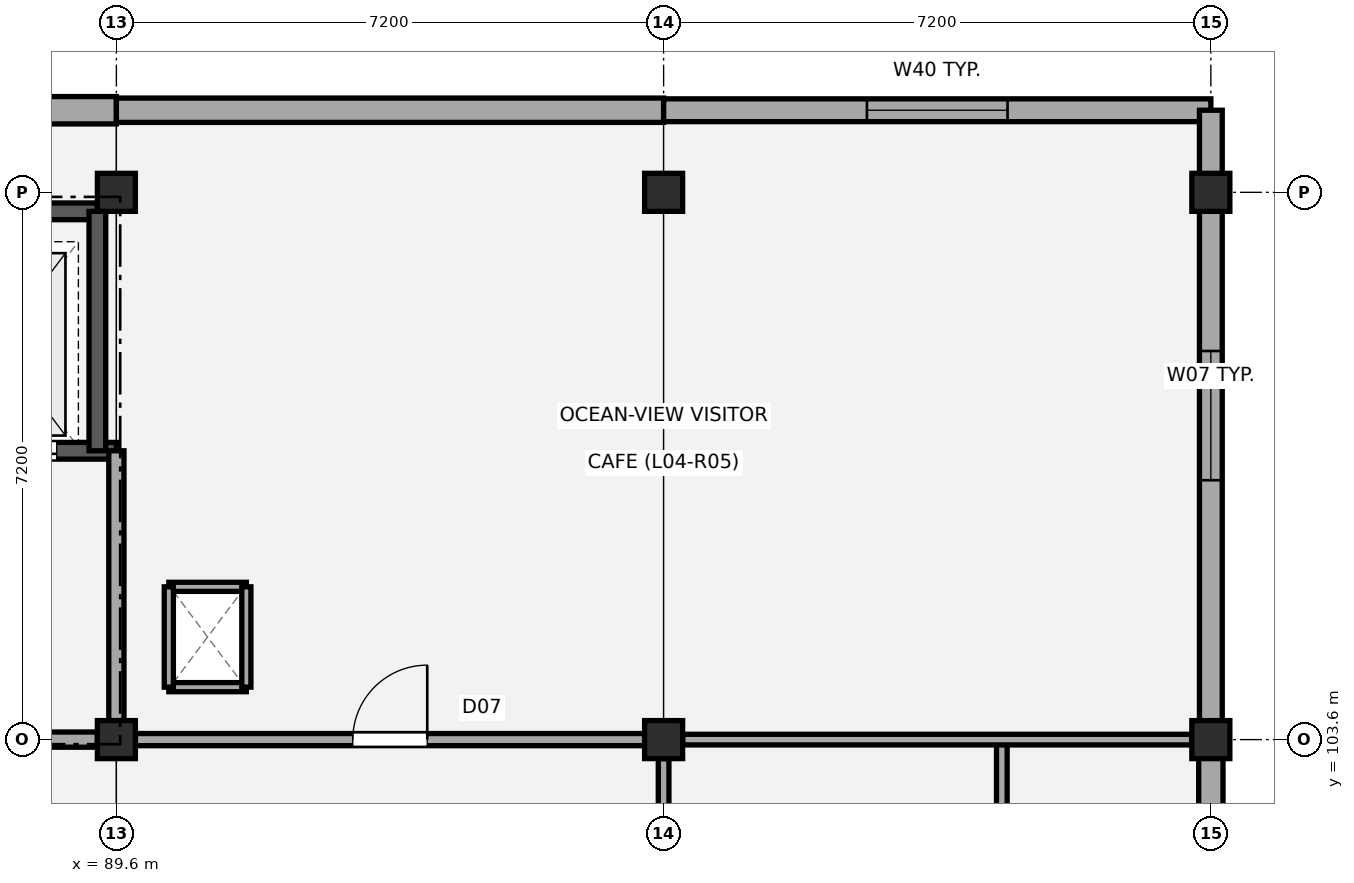
"""IFC4 building model, lengths in metres.
Left out: names, types, materials, properties, quantities, classifications, styles, units other than length and angle.
Written with IfcOpenShell. Run it as: python <this file> out.ifc"""

import sys

from ifc_helpers import new_model, si_unit, direction, frame, frame_2d, origin, origin_2d, place, context, subcontext, project, spatial, rectangle, extrude, element, fill, save


model = new_model("IFC4")
c1 = context("Model", 3, precision=1e-05, world=origin(), true_north=direction((0.0, 1.0)))
c2 = subcontext(c1, "Body", "Model", "MODEL_VIEW")
j1 = project(units=[si_unit("LENGTHUNIT", "METRE"), si_unit("PLANEANGLEUNIT", "RADIAN")], contexts=[c1])
p1 = place(None, origin())
s1 = spatial("IfcSite", under=j1, at=p1, CompositionType="ELEMENT")
p2 = place(p1, origin())
s2 = spatial("IfcBuilding", under=s1, at=p2, CompositionType="ELEMENT")
p3 = place(p2, frame((0.0, 0.0, 17.64)))
s3 = spatial("IfcBuildingStorey", under=s2, at=p3, CompositionType="ELEMENT", Elevation=17.64)
for number, where, z_axis, x_axis in (
    (1, (89.6, 103.6, 0.0), (0.0, 0.0, 1.0), (1.0, 0.0, 0.0)),
    (2, (89.6, 110.8, 0.0), (0.0, 0.0, 1.0), (1.0, 0.0, 0.0)),
    (3, (96.8, 103.6, 0.0), (0.0, 0.0, 1.0), (1.0, 0.0, 0.0)),
    (4, (96.8, 110.8, 0.0), (0.0, 0.0, 1.0), (1.0, 0.0, 0.0)),
    (5, (104.0, 103.6, 0.0), (0.0, 0.0, 1.0), (1.0, 0.0, 0.0)),
    (6, (104.0, 110.8, 0.0), (0.0, 0.0, 1.0), (1.0, 0.0, 0.0)),
):
    element("IfcColumn", number, at=place(p3, frame(where, z_axis=z_axis, x_axis=x_axis)), inside=s3, PredefinedType="COLUMN", context=c2, shape_type="SweptSolid", body=[
        extrude(rectangle(XDim=0.5, YDim=0.5, at=origin_2d()), origin(), (0.0, 0.0, 1.0), 3.96),
    ])
p4 = place(p3, frame((82.4, 111.88, 0.0), z_axis=(0.0, 0.0, 1.0), x_axis=(1.0, 0.0, 0.0)))
e7 = element("IfcWall", 7, at=p4, inside=s3, PredefinedType="STANDARD", context=c2, shape_type="SweptSolid", body=[
    extrude(rectangle(XDim=7.2, YDim=0.36, at=frame_2d((3.6, 0.0))), origin(), (0.0, 0.0, 1.0), 3.69),
])
p5 = place(p3, frame((89.6, 111.88, 0.0), z_axis=(0.0, 0.0, 1.0), x_axis=(1.0, 0.0, 0.0)))
e8 = element("IfcWall", 8, at=p5, inside=s3, PredefinedType="STANDARD", context=c2, shape_type="SweptSolid", body=[
    extrude(rectangle(XDim=7.2, YDim=0.32, at=frame_2d((3.6, 0.0))), origin(), (0.0, 0.0, 1.0), 3.67),
])
p6 = place(p3, frame((96.8, 111.88, 0.0), z_axis=(0.0, 0.0, 1.0), x_axis=(1.0, 0.0, 0.0)))
e9 = element("IfcWall", 9, at=p6, inside=s3, PredefinedType="STANDARD", context=c2, shape_type="SweptSolid", body=[
    extrude(rectangle(XDim=7.2, YDim=0.3, at=frame_2d((3.6, 0.0))), origin(), (0.0, 0.0, 1.0), 3.69),
])
p7 = place(p6, frame((2.675, 0.0, 0.95)))
e10 = element("IfcOpeningElement", 10, at=p7, cuts=e9, PredefinedType="OPENING", context=c2, shape_type="SweptSolid", body=[
    extrude(rectangle(XDim=1.85, YDim=1.9, at=frame_2d((0.925, 0.95))), frame((0.0, 0.16, 0.0), z_axis=(0.0, -1.0, 0.0), x_axis=(1.0, 0.0, 0.0)), (0.0, 0.0, 1.0), 0.32),
])
p8 = place(p3, frame((104.0, 103.355, 0.0), z_axis=(0.0, 0.0, 1.0), x_axis=(0.0, -1.0, 0.0)))
e11 = element("IfcWall", 11, at=p8, inside=s3, PredefinedType="STANDARD", context=c2, shape_type="SweptSolid", body=[
    extrude(rectangle(XDim=6.71, YDim=0.32, at=frame_2d((3.355, 0.0))), origin(), (0.0, 0.0, 1.0), 3.14),
])
p9 = place(p3, frame((104.0, 111.88, 0.0), z_axis=(0.0, 0.0, 1.0), x_axis=(0.0, -1.0, 0.0)))
e12 = element("IfcWall", 12, at=p9, inside=s3, PredefinedType="STANDARD", context=c2, shape_type="SweptSolid", body=[
    extrude(rectangle(XDim=8.035, YDim=0.3, at=frame_2d((4.018, 0.0))), origin(), (0.0, 0.0, 1.0), 3.14),
])
p10 = place(p9, frame((3.167, 0.0, 0.95)))
e13 = element("IfcOpeningElement", 13, at=p10, cuts=e12, PredefinedType="OPENING", context=c2, shape_type="SweptSolid", body=[
    extrude(rectangle(XDim=1.7, YDim=1.75, at=frame_2d((0.85, 0.875))), frame((0.0, 0.16, 0.0), z_axis=(0.0, -1.0, 0.0), x_axis=(1.0, 0.0, 0.0)), (0.0, 0.0, 1.0), 0.32),
])
p11 = place(p3, frame((86.94, 107.4, 0.0), z_axis=(0.0, 0.0, 1.0), x_axis=(1.0, 0.0, 0.0)))
e14 = element("IfcWall", 14, at=p11, inside=s3, PredefinedType="SHEAR", context=c2, shape_type="SweptSolid", body=[
    extrude(rectangle(XDim=2.66, YDim=0.22, at=frame_2d((1.33, 0.0))), origin(), (0.0, 0.0, 1.0), 3.7),
])
p12 = place(p11, frame((0.535, 0.0, 0.0)))
e15 = element("IfcOpeningElement", 15, at=p12, cuts=e14, PredefinedType="OPENING", context=c2, shape_type="SweptSolid", body=[
    extrude(rectangle(XDim=1.34, YDim=2.15, at=frame_2d((0.67, 1.075))), frame((0.0, 0.12, 0.0), z_axis=(0.0, -1.0, 0.0), x_axis=(1.0, 0.0, 0.0)), (0.0, 0.0, 1.0), 0.24),
])
p13 = place(p3, frame((86.94, 110.55, 0.0), z_axis=(0.0, 0.0, 1.0), x_axis=(1.0, 0.0, 0.0)))
e16 = element("IfcWall", 16, at=p13, inside=s3, PredefinedType="SHEAR", context=c2, shape_type="SweptSolid", body=[
    extrude(rectangle(XDim=2.41, YDim=0.22, at=frame_2d((1.205, 0.0))), origin(), (0.0, 0.0, 1.0), 3.7),
])
p14 = place(p3, frame((89.35, 107.4, 0.0), z_axis=(0.0, 0.0, 1.0), x_axis=(0.0, 1.0, 0.0)))
e17 = element("IfcWall", 17, at=p14, inside=s3, PredefinedType="SHEAR", context=c2, shape_type="SweptSolid", body=[
    extrude(rectangle(XDim=3.15, YDim=0.22, at=frame_2d((1.575, 0.0))), origin(), (0.0, 0.0, 1.0), 3.7),
])
p15 = place(p3, frame((89.6, 103.85, 0.0), z_axis=(0.0, 0.0, 1.0), x_axis=(0.0, 1.0, 0.0)))
e18 = element("IfcWall", 18, at=p15, inside=s3, PredefinedType="PARTITIONING", context=c2, shape_type="SweptSolid", body=[
    extrude(rectangle(XDim=3.55, YDim=0.2, at=frame_2d((1.775, 0.0))), origin(), (0.0, 0.0, 1.0), 3.02),
])
p16 = place(p3, frame((86.94, 103.6, 0.0), z_axis=(0.0, 0.0, 1.0), x_axis=(1.0, 0.0, 0.0)))
e19 = element("IfcWall", 19, at=p16, inside=s3, PredefinedType="PARTITIONING", context=c2, shape_type="SweptSolid", body=[
    extrude(rectangle(XDim=2.41, YDim=0.2, at=frame_2d((1.205, 0.0))), origin(), (0.0, 0.0, 1.0), 3.09),
])
p17 = place(p16, frame((0.695, 0.0, 0.0)))
e20 = element("IfcOpeningElement", 20, at=p17, cuts=e19, PredefinedType="OPENING", context=c2, shape_type="SweptSolid", body=[
    extrude(rectangle(XDim=1.02, YDim=2.15, at=frame_2d((0.51, 1.075))), frame((0.0, 0.11, 0.0), z_axis=(0.0, -1.0, 0.0), x_axis=(1.0, 0.0, 0.0)), (0.0, 0.0, 1.0), 0.22),
])
for number, where, z_axis, x_axis in (
    (21, (90.29, 104.29, 0.0), (0.0, 0.0, 1.0), (1.0, 0.0, 0.0)),
    (22, (90.29, 105.61, 0.0), (0.0, 0.0, 1.0), (1.0, 0.0, 0.0)),
):
    element("IfcWall", number, at=place(p3, frame(where, z_axis=z_axis, x_axis=x_axis)), inside=s3, PredefinedType="PARTITIONING", context=c2, shape_type="SweptSolid", body=[
        extrude(rectangle(XDim=1.02, YDim=0.12, at=frame_2d((0.51, 0.0))), origin(), (0.0, 0.0, 1.0), 3.66),
    ])
for number, where, z_axis, x_axis in (
    (23, (90.29, 104.29, 0.0), (0.0, 0.0, 1.0), (0.0, 1.0, 0.0)),
    (24, (91.31, 104.29, 0.0), (0.0, 0.0, 1.0), (0.0, 1.0, 0.0)),
):
    element("IfcWall", number, at=place(p3, frame(where, z_axis=z_axis, x_axis=x_axis)), inside=s3, PredefinedType="PARTITIONING", context=c2, shape_type="SweptSolid", body=[
        extrude(rectangle(XDim=1.32, YDim=0.12, at=frame_2d((0.66, 0.0))), origin(), (0.0, 0.0, 1.0), 3.66),
    ])
p18 = place(p3, frame((101.25, 96.4, 0.0), z_axis=(0.0, 0.0, 1.0), x_axis=(0.0, 1.0, 0.0)))
e25 = element("IfcWall", 25, at=p18, inside=s3, PredefinedType="PARTITIONING", context=c2, shape_type="SweptSolid", body=[
    extrude(rectangle(XDim=7.2, YDim=0.14, at=frame_2d((3.6, 0.0))), origin(), (0.0, 0.0, 1.0), 3.12),
])
p19 = place(p3, frame((97.05, 103.6, 0.0), z_axis=(0.0, 0.0, 1.0), x_axis=(1.0, 0.0, 0.0)))
e26 = element("IfcWall", 26, at=p19, inside=s3, PredefinedType="PARTITIONING", context=c2, shape_type="SweptSolid", body=[
    extrude(rectangle(XDim=6.7, YDim=0.14, at=frame_2d((3.35, 0.0))), origin(), (0.0, 0.0, 1.0), 3.09),
])
p20 = place(p3, frame((96.8, 96.65, 0.0), z_axis=(0.0, 0.0, 1.0), x_axis=(0.0, 1.0, 0.0)))
e27 = element("IfcWall", 27, at=p20, inside=s3, PredefinedType="PARTITIONING", context=c2, shape_type="SweptSolid", body=[
    extrude(rectangle(XDim=6.7, YDim=0.14, at=frame_2d((3.35, 0.0))), origin(), (0.0, 0.0, 1.0), 3.07),
])
p21 = place(p3, frame((89.85, 103.6, 0.0), z_axis=(0.0, 0.0, 1.0), x_axis=(1.0, 0.0, 0.0)))
e28 = element("IfcWall", 28, at=p21, inside=s3, PredefinedType="PARTITIONING", context=c2, shape_type="SweptSolid", body=[
    extrude(rectangle(XDim=6.7, YDim=0.16, at=frame_2d((3.35, 0.0))), origin(), (0.0, 0.0, 1.0), 3.02),
])
p22 = place(p21, frame((2.86, 0.0, 0.0)))
e29 = element("IfcOpeningElement", 29, at=p22, cuts=e28, PredefinedType="OPENING", context=c2, shape_type="SweptSolid", body=[
    extrude(rectangle(XDim=0.98, YDim=2.12, at=frame_2d((0.49, 1.06))), frame((0.0, 0.09, 0.0), z_axis=(0.0, -1.0, 0.0), x_axis=(1.0, 0.0, 0.0)), (0.0, 0.0, 1.0), 0.18),
])
p23 = place(p7, origin())
e30 = element("IfcWindow", 30, at=p23, inside=s3, PartitioningType="SINGLE_PANEL", PredefinedType="WINDOW", context=c2, shape_type="SweptSolid", body=[
    extrude(rectangle(XDim=1.85, YDim=1.9, at=frame_2d((0.925, 0.95))), frame((0.0, 0.03, 0.0), z_axis=(0.0, -1.0, 0.0), x_axis=(1.0, 0.0, 0.0)), (0.0, 0.0, 1.0), 0.06),
])
fill(e10, e30)
p24 = place(p10, origin())
e31 = element("IfcWindow", 31, at=p24, inside=s3, PartitioningType="SINGLE_PANEL", PredefinedType="WINDOW", context=c2, shape_type="SweptSolid", body=[
    extrude(rectangle(XDim=1.7, YDim=1.75, at=frame_2d((0.85, 0.875))), frame((0.0, 0.03, 0.0), z_axis=(0.0, -1.0, 0.0), x_axis=(1.0, 0.0, 0.0)), (0.0, 0.0, 1.0), 0.06),
])
fill(e13, e31)
p25 = place(p12, origin())
e32 = element("IfcDoor", 32, at=p25, inside=s3, OperationType="DOUBLE_DOOR_SLIDING", PredefinedType="DOOR", context=c2, shape_type="SweptSolid", body=[
    extrude(rectangle(XDim=1.34, YDim=2.15, at=frame_2d((0.67, 1.075))), frame((0.0, 0.025, 0.0), z_axis=(0.0, -1.0, 0.0), x_axis=(1.0, 0.0, 0.0)), (0.0, 0.0, 1.0), 0.05),
])
fill(e15, e32)
p26 = place(p22, origin())
e33 = element("IfcDoor", 33, at=p26, inside=s3, OperationType="SINGLE_SWING_RIGHT", PredefinedType="DOOR", context=c2, shape_type="SweptSolid", body=[
    extrude(rectangle(XDim=0.98, YDim=2.12, at=frame_2d((0.49, 1.06))), frame((0.0, 0.025, 0.0), z_axis=(0.0, -1.0, 0.0), x_axis=(1.0, 0.0, 0.0)), (0.0, 0.0, 1.0), 0.05),
])
fill(e29, e33)
save(model, sys.argv[1])
